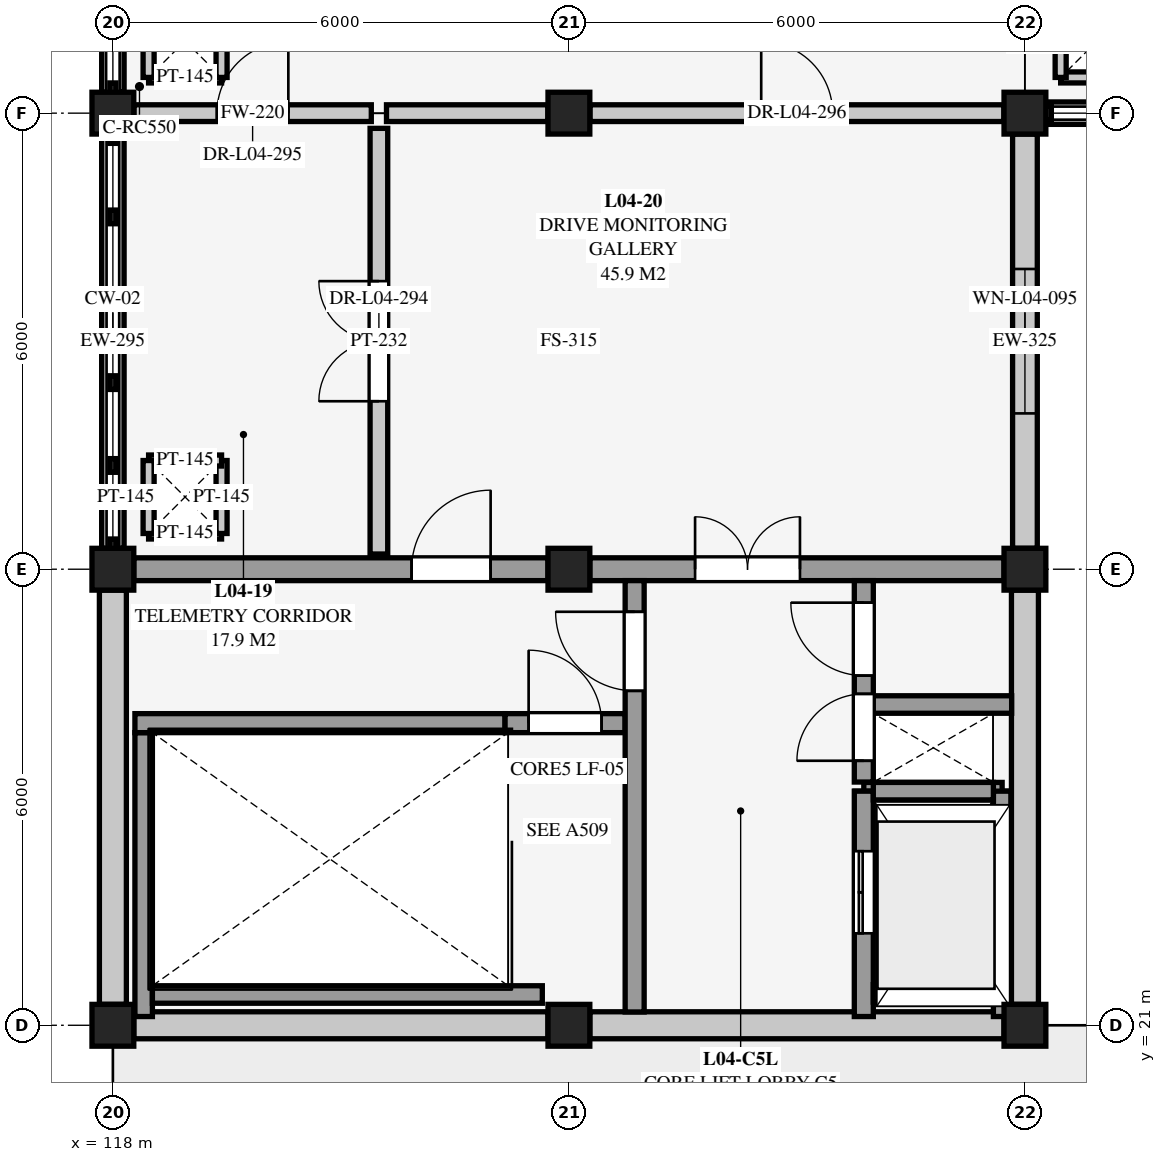
"""IFC4 building model, lengths in metres.
Left out: names, types, materials, properties, quantities, classifications, styles, units other than length and angle.
Written with IfcOpenShell. Run it as: python <this file> out.ifc"""

import sys

from ifc_helpers import new_model, si_unit, direction, frame, frame_2d, origin, origin_2d, place, context, subcontext, project, spatial, rectangle, extrude, element, fill, save


model = new_model("IFC4")
c1 = context("Model", 3, precision=1e-05, world=origin(), true_north=direction((0.0, 1.0)))
c2 = subcontext(c1, "Body", "Model", "MODEL_VIEW")
j1 = project(units=[si_unit("LENGTHUNIT", "METRE"), si_unit("PLANEANGLEUNIT", "RADIAN")], contexts=[c1])
p1 = place(None, origin())
s1 = spatial("IfcSite", under=j1, at=p1, CompositionType="ELEMENT")
p2 = place(p1, origin())
s2 = spatial("IfcBuilding", under=s1, at=p2, CompositionType="ELEMENT")
p3 = place(p2, frame((0.0, 0.0, 13.5)))
s3 = spatial("IfcBuildingStorey", under=s2, at=p3, CompositionType="ELEMENT", Elevation=13.5)
for number, where, z_axis, x_axis in (
    (1, (118.0, 21.0, 0.0), (0.0, 0.0, 1.0), (1.0, 0.0, 0.0)),
    (2, (118.0, 27.0, 0.0), (0.0, 0.0, 1.0), (1.0, 0.0, 0.0)),
    (3, (118.0, 33.0, 0.0), (0.0, 0.0, 1.0), (1.0, 0.0, 0.0)),
    (4, (124.0, 21.0, 0.0), (0.0, 0.0, 1.0), (1.0, 0.0, 0.0)),
    (5, (124.0, 27.0, 0.0), (0.0, 0.0, 1.0), (1.0, 0.0, 0.0)),
    (6, (124.0, 33.0, 0.0), (0.0, 0.0, 1.0), (1.0, 0.0, 0.0)),
    (7, (130.0, 21.0, 0.0), (0.0, 0.0, 1.0), (1.0, 0.0, 0.0)),
    (8, (130.0, 27.0, 0.0), (0.0, 0.0, 1.0), (1.0, 0.0, 0.0)),
    (9, (130.0, 33.0, 0.0), (0.0, 0.0, 1.0), (1.0, 0.0, 0.0)),
):
    element("IfcColumn", number, at=place(p3, frame(where, z_axis=z_axis, x_axis=x_axis)), inside=s3, PredefinedType="COLUMN", context=c2, shape_type="SweptSolid", body=[
        extrude(rectangle(XDim=0.55, YDim=0.55, at=origin_2d()), origin(), (0.0, 0.0, 1.0), 4.5),
    ])
p4 = place(p3, frame((123.725, 21.0, 0.0), z_axis=(0.0, 0.0, 1.0), x_axis=(-1.0, 0.0, 0.0)))
e10 = element("IfcWall", 10, at=p4, inside=s3, PredefinedType="SOLIDWALL", context=c2, shape_type="SweptSolid", body=[
    extrude(rectangle(XDim=5.45, YDim=0.355, at=frame_2d((2.725, 0.0))), origin(), (0.0, 0.0, 1.0), 4.194),
])
p5 = place(p3, frame((129.725, 21.0, 0.0), z_axis=(0.0, 0.0, 1.0), x_axis=(-1.0, 0.0, 0.0)))
e11 = element("IfcWall", 11, at=p5, inside=s3, PredefinedType="SOLIDWALL", context=c2, shape_type="SweptSolid", body=[
    extrude(rectangle(XDim=5.45, YDim=0.355, at=frame_2d((2.725, 0.0))), origin(), (0.0, 0.0, 1.0), 4.234),
])
for number, where, z_axis, x_axis in (
    (12, (118.0, 21.275, 0.0), (0.0, 0.0, 1.0), (0.0, 1.0, 0.0)),
    (13, (130.0, 26.725, 0.0), (0.0, 0.0, 1.0), (0.0, -1.0, 0.0)),
):
    element("IfcWall", number, at=place(p3, frame(where, z_axis=z_axis, x_axis=x_axis)), inside=s3, PredefinedType="SOLIDWALL", context=c2, shape_type="SweptSolid", body=[
        extrude(rectangle(XDim=5.45, YDim=0.355, at=frame_2d((2.725, 0.0))), origin(), (0.0, 0.0, 1.0), 4.093),
    ])
p6 = place(p3, frame((118.0, 27.275, 0.0), z_axis=(0.0, 0.0, 1.0), x_axis=(0.0, 1.0, 0.0)))
e14 = element("IfcWall", 14, at=p6, inside=s3, PredefinedType="SOLIDWALL", context=c2, shape_type="SweptSolid", body=[
    extrude(rectangle(XDim=5.45, YDim=0.295, at=frame_2d((2.725, 0.0))), origin(), (0.0, 0.0, 1.0), 0.21),
])
p7 = place(p3, frame((130.0, 32.725, 0.0), z_axis=(0.0, 0.0, 1.0), x_axis=(0.0, -1.0, 0.0)))
e15 = element("IfcWall", 15, at=p7, inside=s3, PredefinedType="SOLIDWALL", context=c2, shape_type="SweptSolid", body=[
    extrude(rectangle(XDim=5.45, YDim=0.325, at=frame_2d((2.725, 0.0))), origin(), (0.0, 0.0, 1.0), 4.093),
])
p8 = place(p7, frame((1.775, 0.0, 1.2)))
e16 = element("IfcOpeningElement", 16, at=p8, cuts=e15, PredefinedType="OPENING", context=c2, shape_type="SweptSolid", body=[
    extrude(rectangle(XDim=1.9, YDim=1.55, at=frame_2d((0.95, 0.775))), frame((0.0, 0.173, 0.0), z_axis=(0.0, -1.0, 0.0), x_axis=(1.0, 0.0, 0.0)), (0.0, 0.0, 1.0), 0.345),
])
p9 = place(p3, frame((135.725, 33.0, 0.0), z_axis=(0.0, 0.0, 1.0), x_axis=(-1.0, 0.0, 0.0)))
e17 = element("IfcWall", 17, at=p9, inside=s3, PredefinedType="SOLIDWALL", context=c2, shape_type="SweptSolid", body=[
    extrude(rectangle(XDim=5.45, YDim=0.295, at=frame_2d((2.725, 0.0))), origin(), (0.0, 0.0, 1.0), 0.26),
])
p10 = place(p3, frame((118.0, 33.275, 0.0), z_axis=(0.0, 0.0, 1.0), x_axis=(0.0, 1.0, 0.0)))
e18 = element("IfcWall", 18, at=p10, inside=s3, PredefinedType="SOLIDWALL", context=c2, shape_type="SweptSolid", body=[
    extrude(rectangle(XDim=5.45, YDim=0.295, at=frame_2d((2.725, 0.0))), origin(), (0.0, 0.0, 1.0), 0.31),
])
for number, where, z_axis, x_axis in (
    (19, (118.47, 27.47, 0.0), (0.0, 0.0, 1.0), (1.0, 0.0, 0.0)),
    (20, (119.43, 27.47, 0.0), (0.0, 0.0, 1.0), (0.0, 1.0, 0.0)),
    (21, (119.43, 28.43, 0.0), (0.0, 0.0, 1.0), (-1.0, 0.0, 0.0)),
    (22, (118.47, 28.43, 0.0), (0.0, 0.0, 1.0), (0.0, -1.0, 0.0)),
    (23, (118.47, 33.47, 0.0), (0.0, 0.0, 1.0), (1.0, 0.0, 0.0)),
    (24, (119.43, 33.47, 0.0), (0.0, 0.0, 1.0), (0.0, 1.0, 0.0)),
    (25, (118.47, 34.43, 0.0), (0.0, 0.0, 1.0), (0.0, -1.0, 0.0)),
    (26, (130.47, 33.47, 0.0), (0.0, 0.0, 1.0), (1.0, 0.0, 0.0)),
    (27, (130.47, 34.43, 0.0), (0.0, 0.0, 1.0), (0.0, -1.0, 0.0)),
):
    element("IfcWall", number, at=place(p3, frame(where, z_axis=z_axis, x_axis=x_axis)), inside=s3, PredefinedType="PARTITIONING", context=c2, shape_type="SweptSolid", body=[
        extrude(rectangle(XDim=0.96, YDim=0.145, at=frame_2d((0.48, 0.0))), origin(), (0.0, 0.0, 1.0), 4.24),
    ])
p11 = place(p3, frame((127.88, 21.42, 4.5), z_axis=(0.0, 0.0, 1.0), x_axis=(1.0, 0.0, 0.0)))
e28 = element("IfcWall", 28, at=p11, inside=s3, PredefinedType="SHEAR", context=c2, shape_type="SweptSolid", body=[
    extrude(rectangle(XDim=1.82, YDim=0.23, at=frame_2d((0.91, 0.0))), origin(), (0.0, 0.0, 1.0), 1.25),
])
p12 = place(p3, frame((129.7, 21.42, 4.5), z_axis=(0.0, 0.0, 1.0), x_axis=(0.0, 1.0, 0.0)))
e29 = element("IfcWall", 29, at=p12, inside=s3, PredefinedType="SHEAR", context=c2, shape_type="SweptSolid", body=[
    extrude(rectangle(XDim=2.66, YDim=0.23, at=frame_2d((1.33, 0.0))), origin(), (0.0, 0.0, 1.0), 1.25),
])
p13 = place(p3, frame((129.7, 24.08, 4.5), z_axis=(0.0, 0.0, 1.0), x_axis=(-1.0, 0.0, 0.0)))
e30 = element("IfcWall", 30, at=p13, inside=s3, PredefinedType="SHEAR", context=c2, shape_type="SweptSolid", body=[
    extrude(rectangle(XDim=1.82, YDim=0.23, at=frame_2d((0.91, 0.0))), origin(), (0.0, 0.0, 1.0), 1.25),
])
p14 = place(p3, frame((127.88, 24.08, 4.5), z_axis=(0.0, 0.0, 1.0), x_axis=(0.0, -1.0, 0.0)))
e31 = element("IfcWall", 31, at=p14, inside=s3, PredefinedType="SHEAR", context=c2, shape_type="SweptSolid", body=[
    extrude(rectangle(XDim=2.66, YDim=0.23, at=frame_2d((1.33, 0.0))), origin(), (0.0, 0.0, 1.0), 1.25),
])
p15 = place(p3, frame((118.275, 27.0, 0.0), z_axis=(0.0, 0.0, 1.0), x_axis=(1.0, 0.0, 0.0)))
e32 = element("IfcWall", 32, at=p15, inside=s3, PredefinedType="SHEAR", context=c2, shape_type="SweptSolid", body=[
    extrude(rectangle(XDim=5.45, YDim=0.3, at=frame_2d((2.725, 0.0))), origin(), (0.0, 0.0, 1.0), 4.24),
])
p16 = place(p15, frame((3.655, 0.0, 0.0)))
e33 = element("IfcOpeningElement", 33, at=p16, cuts=e32, PredefinedType="OPENING", context=c2, shape_type="SweptSolid", body=[
    extrude(rectangle(XDim=1.04, YDim=2.14, at=frame_2d((0.52, 1.07))), frame((0.0, 0.16, 0.0), z_axis=(0.0, -1.0, 0.0), x_axis=(1.0, 0.0, 0.0)), (0.0, 0.0, 1.0), 0.32),
])
p17 = place(p3, frame((124.275, 27.0, 0.0), z_axis=(0.0, 0.0, 1.0), x_axis=(1.0, 0.0, 0.0)))
e34 = element("IfcWall", 34, at=p17, inside=s3, PredefinedType="SHEAR", context=c2, shape_type="SweptSolid", body=[
    extrude(rectangle(XDim=5.45, YDim=0.3, at=frame_2d((2.725, 0.0))), origin(), (0.0, 0.0, 1.0), 4.24),
])
p18 = place(p17, frame((1.385, 0.0, 0.0)))
e35 = element("IfcOpeningElement", 35, at=p18, cuts=e34, PredefinedType="OPENING", context=c2, shape_type="SweptSolid", body=[
    extrude(rectangle(XDim=1.38, YDim=2.16, at=frame_2d((0.69, 1.08))), frame((0.0, 0.16, 0.0), z_axis=(0.0, -1.0, 0.0), x_axis=(1.0, 0.0, 0.0)), (0.0, 0.0, 1.0), 0.32),
])
p19 = place(p3, frame((118.405, 21.115, 0.0), z_axis=(0.0, 0.0, 1.0), x_axis=(0.0, 1.0, 0.0)))
e36 = element("IfcWall", 36, at=p19, inside=s3, PredefinedType="SHEAR", context=c2, shape_type="SweptSolid", body=[
    extrude(rectangle(XDim=3.735, YDim=0.23, at=frame_2d((1.868, 0.0))), origin(), (0.0, 0.0, 1.0), 4.5),
])
p20 = place(p3, frame((118.52, 21.405, 0.0), z_axis=(0.0, 0.0, 1.0), x_axis=(1.0, 0.0, 0.0)))
e37 = element("IfcWall", 37, at=p20, inside=s3, PredefinedType="SHEAR", context=c2, shape_type="SweptSolid", body=[
    extrude(rectangle(XDim=5.13, YDim=0.23, at=frame_2d((2.565, 0.0))), origin(), (0.0, 0.0, 1.0), 4.5),
])
p21 = place(p3, frame((118.29, 24.975, 0.0), z_axis=(0.0, 0.0, 1.0), x_axis=(1.0, 0.0, 0.0)))
e38 = element("IfcWall", 38, at=p21, inside=s3, PredefinedType="SHEAR", context=c2, shape_type="SweptSolid", body=[
    extrude(rectangle(XDim=4.87, YDim=0.25, at=frame_2d((2.435, 0.0))), origin(), (0.0, 0.0, 1.0), 4.5),
])
p22 = place(p3, frame((123.16, 24.975, 0.0), z_axis=(0.0, 0.0, 1.0), x_axis=(1.0, 0.0, 0.0)))
e39 = element("IfcWall", 39, at=p22, inside=s3, PredefinedType="SHEAR", context=c2, shape_type="SweptSolid", body=[
    extrude(rectangle(XDim=1.58, YDim=0.25, at=frame_2d((0.79, 0.0))), origin(), (0.0, 0.0, 1.0), 4.24),
])
p23 = place(p22, frame((0.31, 0.0, 0.0)))
e40 = element("IfcOpeningElement", 40, at=p23, cuts=e39, PredefinedType="OPENING", context=c2, shape_type="SweptSolid", body=[
    extrude(rectangle(XDim=0.96, YDim=2.12, at=frame_2d((0.48, 1.06))), frame((0.0, 0.135, 0.0), z_axis=(0.0, -1.0, 0.0), x_axis=(1.0, 0.0, 0.0)), (0.0, 0.0, 1.0), 0.27),
])
p24 = place(p3, frame((124.865, 21.175, 0.0), z_axis=(0.0, 0.0, 1.0), x_axis=(0.0, 1.0, 0.0)))
e41 = element("IfcWall", 41, at=p24, inside=s3, PredefinedType="SHEAR", context=c2, shape_type="SweptSolid", body=[
    extrude(rectangle(XDim=5.675, YDim=0.25, at=frame_2d((2.837, 0.0))), origin(), (0.0, 0.0, 1.0), 4.24),
])
p25 = place(p24, frame((4.225, 0.0, 0.0)))
e42 = element("IfcOpeningElement", 42, at=p25, cuts=e41, PredefinedType="OPENING", context=c2, shape_type="SweptSolid", body=[
    extrude(rectangle(XDim=1.04, YDim=2.14, at=frame_2d((0.52, 1.07))), frame((0.0, 0.135, 0.0), z_axis=(0.0, -1.0, 0.0), x_axis=(1.0, 0.0, 0.0)), (0.0, 0.0, 1.0), 0.27),
])
p26 = place(p3, frame((127.88, 21.115, 0.0), z_axis=(0.0, 0.0, 1.0), x_axis=(0.0, 1.0, 0.0)))
e43 = element("IfcWall", 43, at=p26, inside=s3, PredefinedType="SHEAR", context=c2, shape_type="SweptSolid", body=[
    extrude(rectangle(XDim=2.965, YDim=0.25, at=frame_2d((1.482, 0.0))), origin(), (0.0, 0.0, 1.0), 4.5),
])
p27 = place(p26, frame((1.095, 0.0, 0.0)))
e44 = element("IfcOpeningElement", 44, at=p27, cuts=e43, PredefinedType="OPENING", context=c2, shape_type="SweptSolid", body=[
    extrude(rectangle(XDim=1.08, YDim=2.15, at=frame_2d((0.54, 1.075))), frame((0.0, 0.135, 0.0), z_axis=(0.0, -1.0, 0.0), x_axis=(1.0, 0.0, 0.0)), (0.0, 0.0, 1.0), 0.27),
])
p28 = place(p3, frame((128.005, 21.42, 0.0), z_axis=(0.0, 0.0, 1.0), x_axis=(1.0, 0.0, 0.0)))
e45 = element("IfcWall", 45, at=p28, inside=s3, PredefinedType="SHEAR", context=c2, shape_type="SweptSolid", body=[
    extrude(rectangle(XDim=1.58, YDim=0.23, at=frame_2d((0.79, 0.0))), origin(), (0.0, 0.0, 1.0), 4.5),
])
p29 = place(p3, frame((129.7, 21.115, 0.0), z_axis=(0.0, 0.0, 1.0), x_axis=(0.0, 1.0, 0.0)))
e46 = element("IfcWall", 46, at=p29, inside=s3, PredefinedType="SHEAR", context=c2, shape_type="SweptSolid", body=[
    extrude(rectangle(XDim=2.965, YDim=0.23, at=frame_2d((1.482, 0.0))), origin(), (0.0, 0.0, 1.0), 4.5),
])
p30 = place(p3, frame((128.005, 24.08, 0.0), z_axis=(0.0, 0.0, 1.0), x_axis=(1.0, 0.0, 0.0)))
e47 = element("IfcWall", 47, at=p30, inside=s3, PredefinedType="SHEAR", context=c2, shape_type="SweptSolid", body=[
    extrude(rectangle(XDim=1.58, YDim=0.23, at=frame_2d((0.79, 0.0))), origin(), (0.0, 0.0, 1.0), 4.5),
])
p31 = place(p3, frame((127.88, 24.2, 0.0), z_axis=(0.0, 0.0, 1.0), x_axis=(0.0, 1.0, 0.0)))
e48 = element("IfcWall", 48, at=p31, inside=s3, PredefinedType="SHEAR", context=c2, shape_type="SweptSolid", body=[
    extrude(rectangle(XDim=2.65, YDim=0.25, at=frame_2d((1.325, 0.0))), origin(), (0.0, 0.0, 1.0), 4.24),
])
p32 = place(p31, frame((0.28, 0.0, 0.0)))
e49 = element("IfcOpeningElement", 49, at=p32, cuts=e48, PredefinedType="OPENING", context=c2, shape_type="SweptSolid", body=[
    extrude(rectangle(XDim=0.88, YDim=2.08, at=frame_2d((0.44, 1.04))), frame((0.0, 0.135, 0.0), z_axis=(0.0, -1.0, 0.0), x_axis=(1.0, 0.0, 0.0)), (0.0, 0.0, 1.0), 0.27),
])
p33 = place(p31, frame((1.4, 0.0, 0.0)))
e50 = element("IfcOpeningElement", 50, at=p33, cuts=e48, PredefinedType="OPENING", context=c2, shape_type="SweptSolid", body=[
    extrude(rectangle(XDim=0.96, YDim=2.12, at=frame_2d((0.48, 1.06))), frame((0.0, 0.135, 0.0), z_axis=(0.0, -1.0, 0.0), x_axis=(1.0, 0.0, 0.0)), (0.0, 0.0, 1.0), 0.27),
])
p34 = place(p3, frame((128.005, 25.22, 0.0), z_axis=(0.0, 0.0, 1.0), x_axis=(1.0, 0.0, 0.0)))
e51 = element("IfcWall", 51, at=p34, inside=s3, PredefinedType="SHEAR", context=c2, shape_type="SweptSolid", body=[
    extrude(rectangle(XDim=1.82, YDim=0.23, at=frame_2d((0.91, 0.0))), origin(), (0.0, 0.0, 1.0), 4.24),
])
p35 = place(p3, frame((121.5, 27.2, 0.0), z_axis=(0.0, 0.0, 1.0), x_axis=(0.0, 1.0, 0.0)))
e52 = element("IfcWall", 52, at=p35, inside=s3, PredefinedType="PARTITIONING", context=c2, shape_type="SweptSolid", body=[
    extrude(rectangle(XDim=5.6, YDim=0.232, at=frame_2d((2.8, 0.0))), origin(), (0.0, 0.0, 1.0), 4.24),
])
p36 = place(p35, frame((2.01, 0.0, 0.0)))
e53 = element("IfcOpeningElement", 53, at=p36, cuts=e52, PredefinedType="OPENING", context=c2, shape_type="SweptSolid", body=[
    extrude(rectangle(XDim=1.58, YDim=2.2, at=frame_2d((0.79, 1.1))), frame((0.0, 0.126, 0.0), z_axis=(0.0, -1.0, 0.0), x_axis=(1.0, 0.0, 0.0)), (0.0, 0.0, 1.0), 0.252),
])
p37 = place(p3, frame((118.277, 33.0, 0.0), z_axis=(0.0, 0.0, 1.0), x_axis=(1.0, 0.0, 0.0)))
e54 = element("IfcWall", 54, at=p37, inside=s3, PredefinedType="SOLIDWALL", context=c2, shape_type="SweptSolid", body=[
    extrude(rectangle(XDim=3.123, YDim=0.22, at=frame_2d((1.562, 0.0))), origin(), (0.0, 0.0, 1.0), 4.146),
])
p38 = place(p37, frame((1.092, 0.0, 0.0)))
e55 = element("IfcOpeningElement", 55, at=p38, cuts=e54, PredefinedType="OPENING", context=c2, shape_type="SweptSolid", body=[
    extrude(rectangle(XDim=0.94, YDim=2.1, at=frame_2d((0.47, 1.05))), frame((0.0, 0.12, 0.0), z_axis=(0.0, -1.0, 0.0), x_axis=(1.0, 0.0, 0.0)), (0.0, 0.0, 1.0), 0.24),
])
p39 = place(p3, frame((124.277, 33.0, 0.0), z_axis=(0.0, 0.0, 1.0), x_axis=(1.0, 0.0, 0.0)))
e56 = element("IfcWall", 56, at=p39, inside=s3, PredefinedType="SOLIDWALL", context=c2, shape_type="SweptSolid", body=[
    extrude(rectangle(XDim=5.446, YDim=0.22, at=frame_2d((2.723, 0.0))), origin(), (0.0, 0.0, 1.0), 4.24),
])
p40 = place(p39, frame((2.253, 0.0, 0.0)))
e57 = element("IfcOpeningElement", 57, at=p40, cuts=e56, PredefinedType="OPENING", context=c2, shape_type="SweptSolid", body=[
    extrude(rectangle(XDim=0.94, YDim=2.1, at=frame_2d((0.47, 1.05))), frame((0.0, 0.12, 0.0), z_axis=(0.0, -1.0, 0.0), x_axis=(1.0, 0.0, 0.0)), (0.0, 0.0, 1.0), 0.24),
])
p41 = place(p3, frame((121.6, 33.0, 0.0), z_axis=(0.0, 0.0, 1.0), x_axis=(1.0, 0.0, 0.0)))
e58 = element("IfcWall", 58, at=p41, inside=s3, PredefinedType="SOLIDWALL", context=c2, shape_type="SweptSolid", body=[
    extrude(rectangle(XDim=2.123, YDim=0.22, at=frame_2d((1.062, 0.0))), origin(), (0.0, 0.0, 1.0), 4.146),
])
p42 = place(p8, origin())
e59 = element("IfcWindow", 59, at=p42, inside=s3, PartitioningType="SINGLE_PANEL", PredefinedType="WINDOW", context=c2, shape_type="SweptSolid", body=[
    extrude(rectangle(XDim=1.9, YDim=1.55, at=frame_2d((0.95, 0.775))), frame((0.0, 0.03, 0.0), z_axis=(0.0, -1.0, 0.0), x_axis=(1.0, 0.0, 0.0)), (0.0, 0.0, 1.0), 0.06),
])
fill(e16, e59)
p43 = place(p16, origin())
e60 = element("IfcDoor", 60, at=p43, inside=s3, OperationType="SINGLE_SWING_RIGHT", PredefinedType="DOOR", context=c2, shape_type="SweptSolid", body=[
    extrude(rectangle(XDim=1.04, YDim=2.14, at=frame_2d((0.52, 1.07))), frame((0.0, 0.025, 0.0), z_axis=(0.0, -1.0, 0.0), x_axis=(1.0, 0.0, 0.0)), (0.0, 0.0, 1.0), 0.05),
])
fill(e33, e60)
p44 = place(p18, origin())
e61 = element("IfcDoor", 61, at=p44, inside=s3, OperationType="DOUBLE_DOOR_SINGLE_SWING", PredefinedType="DOOR", context=c2, shape_type="SweptSolid", body=[
    extrude(rectangle(XDim=1.38, YDim=2.16, at=frame_2d((0.69, 1.08))), frame((0.0, 0.025, 0.0), z_axis=(0.0, -1.0, 0.0), x_axis=(1.0, 0.0, 0.0)), (0.0, 0.0, 1.0), 0.05),
])
fill(e35, e61)
p45 = place(p23, origin())
e62 = element("IfcDoor", 62, at=p45, inside=s3, OperationType="SINGLE_SWING_LEFT", PredefinedType="DOOR", context=c2, shape_type="SweptSolid", body=[
    extrude(rectangle(XDim=0.96, YDim=2.12, at=frame_2d((0.48, 1.06))), frame((0.0, 0.025, 0.0), z_axis=(0.0, -1.0, 0.0), x_axis=(1.0, 0.0, 0.0)), (0.0, 0.0, 1.0), 0.05),
])
fill(e40, e62)
p46 = place(p25, origin())
e63 = element("IfcDoor", 63, at=p46, inside=s3, OperationType="SINGLE_SWING_RIGHT", PredefinedType="DOOR", context=c2, shape_type="SweptSolid", body=[
    extrude(rectangle(XDim=1.04, YDim=2.14, at=frame_2d((0.52, 1.07))), frame((0.0, 0.025, 0.0), z_axis=(0.0, -1.0, 0.0), x_axis=(1.0, 0.0, 0.0)), (0.0, 0.0, 1.0), 0.05),
])
fill(e42, e63)
p47 = place(p27, origin())
e64 = element("IfcDoor", 64, at=p47, inside=s3, OperationType="DOUBLE_DOOR_SLIDING", PredefinedType="DOOR", context=c2, shape_type="SweptSolid", body=[
    extrude(rectangle(XDim=1.08, YDim=2.15, at=frame_2d((0.54, 1.075))), frame((0.0, 0.025, 0.0), z_axis=(0.0, -1.0, 0.0), x_axis=(1.0, 0.0, 0.0)), (0.0, 0.0, 1.0), 0.05),
])
fill(e44, e64)
p48 = place(p32, origin())
e65 = element("IfcDoor", 65, at=p48, inside=s3, OperationType="SINGLE_SWING_LEFT", PredefinedType="DOOR", context=c2, shape_type="SweptSolid", body=[
    extrude(rectangle(XDim=0.88, YDim=2.08, at=frame_2d((0.44, 1.04))), frame((0.0, 0.025, 0.0), z_axis=(0.0, -1.0, 0.0), x_axis=(1.0, 0.0, 0.0)), (0.0, 0.0, 1.0), 0.05),
])
fill(e49, e65)
p49 = place(p33, origin())
e66 = element("IfcDoor", 66, at=p49, inside=s3, OperationType="SINGLE_SWING_RIGHT", PredefinedType="DOOR", context=c2, shape_type="SweptSolid", body=[
    extrude(rectangle(XDim=0.96, YDim=2.12, at=frame_2d((0.48, 1.06))), frame((0.0, 0.025, 0.0), z_axis=(0.0, -1.0, 0.0), x_axis=(1.0, 0.0, 0.0)), (0.0, 0.0, 1.0), 0.05),
])
fill(e50, e66)
p50 = place(p36, origin())
e67 = element("IfcDoor", 67, at=p50, inside=s3, OperationType="DOUBLE_DOOR_SINGLE_SWING", PredefinedType="DOOR", context=c2, shape_type="SweptSolid", body=[
    extrude(rectangle(XDim=1.58, YDim=2.2, at=frame_2d((0.79, 1.1))), frame((0.0, 0.025, 0.0), z_axis=(0.0, -1.0, 0.0), x_axis=(1.0, 0.0, 0.0)), (0.0, 0.0, 1.0), 0.05),
])
fill(e53, e67)
p51 = place(p38, origin())
e68 = element("IfcDoor", 68, at=p51, inside=s3, OperationType="SINGLE_SWING_RIGHT", PredefinedType="DOOR", context=c2, shape_type="SweptSolid", body=[
    extrude(rectangle(XDim=0.94, YDim=2.1, at=frame_2d((0.47, 1.05))), frame((0.0, 0.025, 0.0), z_axis=(0.0, -1.0, 0.0), x_axis=(1.0, 0.0, 0.0)), (0.0, 0.0, 1.0), 0.05),
])
fill(e55, e68)
p52 = place(p40, origin())
e69 = element("IfcDoor", 69, at=p52, inside=s3, OperationType="SINGLE_SWING_LEFT", PredefinedType="DOOR", context=c2, shape_type="SweptSolid", body=[
    extrude(rectangle(XDim=0.94, YDim=2.1, at=frame_2d((0.47, 1.05))), frame((0.0, 0.025, 0.0), z_axis=(0.0, -1.0, 0.0), x_axis=(1.0, 0.0, 0.0)), (0.0, 0.0, 1.0), 0.05),
])
fill(e57, e69)
save(model, sys.argv[1])
